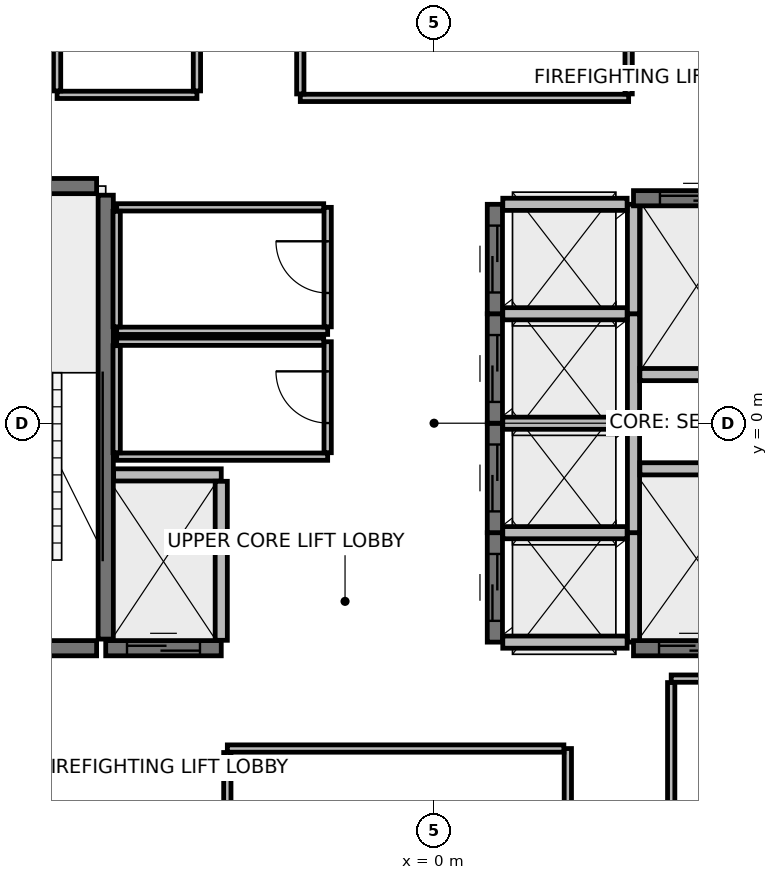
"""IFC4 building model, lengths in metres.
Left out: names, types, materials, properties, quantities, classifications, styles, units other than length and angle.
Written with IfcOpenShell. Run it as: python <this file> out.ifc"""

import sys

from ifc_helpers import new_model, si_unit, direction, frame, frame_2d, origin, place, context, subcontext, project, spatial, rectangle, extrude, element, fill, save


model = new_model("IFC4")
c1 = context("Model", 3, precision=1e-05, world=origin(), true_north=direction((0.0, 1.0)))
c2 = subcontext(c1, "Body", "Model", "MODEL_VIEW")
j1 = project(units=[si_unit("LENGTHUNIT", "METRE"), si_unit("PLANEANGLEUNIT", "RADIAN")], contexts=[c1])
p1 = place(None, origin())
s1 = spatial("IfcSite", under=j1, at=p1, CompositionType="ELEMENT")
p2 = place(p1, origin())
s2 = spatial("IfcBuilding", under=s1, at=p2, CompositionType="ELEMENT")
p3 = place(p2, frame((0.0, 0.0, 306.3)))
s3 = spatial("IfcBuildingStorey", under=s2, at=p3, CompositionType="ELEMENT", Elevation=306.3)
p4 = place(p3, frame((-24.537, -0.339, 0.0), z_axis=(0.0, 0.0, 1.0), x_axis=(0.669127961041, -0.743147207324, 0.0)))
e1 = element("IfcWall", 1, at=p4, inside=s3, PredefinedType="STANDARD", context=c2, shape_type="SweptSolid", body=[
    extrude(rectangle(XDim=42.14, YDim=0.3, at=frame_2d((21.07, 0.0))), origin(), (0.0, 0.0, 1.0), 3.805),
])
p5 = place(p4, frame((20.27, 0.0, 0.0)))
e2 = element("IfcOpeningElement", 2, at=p5, cuts=e1, PredefinedType="OPENING", context=c2, shape_type="SweptSolid", body=[
    extrude(rectangle(XDim=1.6, YDim=2.3, at=frame_2d((0.8, 1.15))), frame((0.0, 0.16, 0.0), z_axis=(0.0, -1.0, 0.0), x_axis=(1.0, 0.0, 0.0)), (0.0, 0.0, 1.0), 0.32),
])
p6 = place(p4, frame((9.535, 0.0, 0.85)))
e3 = element("IfcOpeningElement", 3, at=p6, cuts=e1, PredefinedType="OPENING", context=c2, shape_type="SweptSolid", body=[
    extrude(rectangle(XDim=2.0, YDim=2.4, at=frame_2d((1.0, 1.2))), frame((0.0, 0.16, 0.0), z_axis=(0.0, -1.0, 0.0), x_axis=(1.0, 0.0, 0.0)), (0.0, 0.0, 1.0), 0.32),
])
p7 = place(p4, frame((30.605, 0.0, 0.85)))
e4 = element("IfcOpeningElement", 4, at=p7, cuts=e1, PredefinedType="OPENING", context=c2, shape_type="SweptSolid", body=[
    extrude(rectangle(XDim=2.0, YDim=2.4, at=frame_2d((1.0, 1.2))), frame((0.0, 0.16, 0.0), z_axis=(0.0, -1.0, 0.0), x_axis=(1.0, 0.0, 0.0)), (0.0, 0.0, 1.0), 0.32),
])
p8 = place(p3, frame((-5.4, -3.55, 0.0), z_axis=(0.0, 0.0, 1.0), x_axis=(0.0, 1.0, 0.0)))
e5 = element("IfcWall", 5, at=p8, inside=s3, PredefinedType="SHEAR", context=c2, shape_type="SweptSolid", body=[
    extrude(rectangle(XDim=7.3, YDim=0.25, at=frame_2d((3.65, 0.0))), origin(), (0.0, 0.0, 1.0), 4.31),
])
p9 = place(p3, frame((-8.5, -3.7, 0.0), z_axis=(0.0, 0.0, 1.0), x_axis=(1.0, 0.0, 0.0)))
e6 = element("IfcWall", 6, at=p9, inside=s3, PredefinedType="SHEAR", context=c2, shape_type="SweptSolid", body=[
    extrude(rectangle(XDim=2.95, YDim=0.25, at=frame_2d((1.475, 0.0))), origin(), (0.0, 0.0, 1.0), 4.31),
])
p10 = place(p9, frame((0.9, 0.0, 0.0)))
e7 = element("IfcOpeningElement", 7, at=p10, cuts=e6, PredefinedType="OPENING", context=c2, shape_type="SweptSolid", body=[
    extrude(rectangle(XDim=1.1, YDim=2.15, at=frame_2d((0.55, 1.075))), frame((0.0, 0.135, 0.0), z_axis=(0.0, -1.0, 0.0), x_axis=(1.0, 0.0, 0.0)), (0.0, 0.0, 1.0), 0.27),
])
p11 = place(p3, frame((-8.5, 3.9, 0.0), z_axis=(0.0, 0.0, 1.0), x_axis=(1.0, 0.0, 0.0)))
e8 = element("IfcWall", 8, at=p11, inside=s3, PredefinedType="SHEAR", context=c2, shape_type="SweptSolid", body=[
    extrude(rectangle(XDim=2.95, YDim=0.25, at=frame_2d((1.475, 0.0))), origin(), (0.0, 0.0, 1.0), 4.31),
])
p12 = place(p3, frame((1.0, -3.6, 0.0), z_axis=(0.0, 0.0, 1.0), x_axis=(0.0, 1.0, 0.0)))
e9 = element("IfcWall", 9, at=p12, inside=s3, PredefinedType="SHEAR", context=c2, shape_type="SweptSolid", body=[
    extrude(rectangle(XDim=1.8, YDim=0.25, at=frame_2d((0.9, 0.0))), origin(), (0.0, 0.0, 1.0), 4.31),
])
p13 = place(p12, frame((0.35, 0.0, 0.0)))
e10 = element("IfcOpeningElement", 10, at=p13, cuts=e9, PredefinedType="OPENING", context=c2, shape_type="SweptSolid", body=[
    extrude(rectangle(XDim=1.1, YDim=2.2, at=frame_2d((0.55, 1.1))), frame((0.0, 0.135, 0.0), z_axis=(0.0, -1.0, 0.0), x_axis=(1.0, 0.0, 0.0)), (0.0, 0.0, 1.0), 0.27),
])
p14 = place(p3, frame((3.28, -3.6, 0.0), z_axis=(0.0, 0.0, 1.0), x_axis=(0.0, 1.0, 0.0)))
e11 = element("IfcWall", 11, at=p14, inside=s3, PredefinedType="PARTITIONING", context=c2, shape_type="SweptSolid", body=[
    extrude(rectangle(XDim=1.8, YDim=0.2, at=frame_2d((0.9, 0.0))), origin(), (0.0, 0.0, 1.0), 4.31),
])
for number, where, z_axis, x_axis in (
    (12, (1.13, -3.6, 0.0), (0.0, 0.0, 1.0), (1.0, 0.0, 0.0)),
    (13, (1.13, -1.8, 0.0), (0.0, 0.0, 1.0), (1.0, 0.0, 0.0)),
):
    element("IfcWall", number, at=place(p3, frame(where, z_axis=z_axis, x_axis=x_axis)), inside=s3, PredefinedType="PARTITIONING", context=c2, shape_type="SweptSolid", body=[
        extrude(rectangle(XDim=2.045, YDim=0.2, at=frame_2d((1.022, 0.0))), origin(), (0.0, 0.0, 1.0), 4.31),
    ])
p15 = place(p3, frame((1.0, -1.8, 0.0), z_axis=(0.0, 0.0, 1.0), x_axis=(0.0, 1.0, 0.0)))
e14 = element("IfcWall", 14, at=p15, inside=s3, PredefinedType="SHEAR", context=c2, shape_type="SweptSolid", body=[
    extrude(rectangle(XDim=1.8, YDim=0.25, at=frame_2d((0.9, 0.0))), origin(), (0.0, 0.0, 1.0), 4.31),
])
p16 = place(p15, frame((0.35, 0.0, 0.0)))
e15 = element("IfcOpeningElement", 15, at=p16, cuts=e14, PredefinedType="OPENING", context=c2, shape_type="SweptSolid", body=[
    extrude(rectangle(XDim=1.1, YDim=2.2, at=frame_2d((0.55, 1.1))), frame((0.0, 0.135, 0.0), z_axis=(0.0, -1.0, 0.0), x_axis=(1.0, 0.0, 0.0)), (0.0, 0.0, 1.0), 0.27),
])
p17 = place(p3, frame((3.28, -1.8, 0.0), z_axis=(0.0, 0.0, 1.0), x_axis=(0.0, 1.0, 0.0)))
e16 = element("IfcWall", 16, at=p17, inside=s3, PredefinedType="PARTITIONING", context=c2, shape_type="SweptSolid", body=[
    extrude(rectangle(XDim=1.8, YDim=0.2, at=frame_2d((0.9, 0.0))), origin(), (0.0, 0.0, 1.0), 4.31),
])
p18 = place(p3, frame((1.13, 0.0, 0.0), z_axis=(0.0, 0.0, 1.0), x_axis=(1.0, 0.0, 0.0)))
e17 = element("IfcWall", 17, at=p18, inside=s3, PredefinedType="PARTITIONING", context=c2, shape_type="SweptSolid", body=[
    extrude(rectangle(XDim=2.045, YDim=0.2, at=frame_2d((1.022, 0.0))), origin(), (0.0, 0.0, 1.0), 4.31),
])
p19 = place(p3, frame((1.0, 0.0, 0.0), z_axis=(0.0, 0.0, 1.0), x_axis=(0.0, 1.0, 0.0)))
e18 = element("IfcWall", 18, at=p19, inside=s3, PredefinedType="SHEAR", context=c2, shape_type="SweptSolid", body=[
    extrude(rectangle(XDim=1.8, YDim=0.25, at=frame_2d((0.9, 0.0))), origin(), (0.0, 0.0, 1.0), 4.31),
])
p20 = place(p19, frame((0.35, 0.0, 0.0)))
e19 = element("IfcOpeningElement", 19, at=p20, cuts=e18, PredefinedType="OPENING", context=c2, shape_type="SweptSolid", body=[
    extrude(rectangle(XDim=1.1, YDim=2.2, at=frame_2d((0.55, 1.1))), frame((0.0, 0.135, 0.0), z_axis=(0.0, -1.0, 0.0), x_axis=(1.0, 0.0, 0.0)), (0.0, 0.0, 1.0), 0.27),
])
p21 = place(p3, frame((3.28, 0.0, 0.0), z_axis=(0.0, 0.0, 1.0), x_axis=(0.0, 1.0, 0.0)))
e20 = element("IfcWall", 20, at=p21, inside=s3, PredefinedType="PARTITIONING", context=c2, shape_type="SweptSolid", body=[
    extrude(rectangle(XDim=1.8, YDim=0.2, at=frame_2d((0.9, 0.0))), origin(), (0.0, 0.0, 1.0), 4.31),
])
p22 = place(p3, frame((1.13, 1.8, 0.0), z_axis=(0.0, 0.0, 1.0), x_axis=(1.0, 0.0, 0.0)))
e21 = element("IfcWall", 21, at=p22, inside=s3, PredefinedType="PARTITIONING", context=c2, shape_type="SweptSolid", body=[
    extrude(rectangle(XDim=2.045, YDim=0.2, at=frame_2d((1.022, 0.0))), origin(), (0.0, 0.0, 1.0), 4.31),
])
p23 = place(p3, frame((1.0, 1.8, 0.0), z_axis=(0.0, 0.0, 1.0), x_axis=(0.0, 1.0, 0.0)))
e22 = element("IfcWall", 22, at=p23, inside=s3, PredefinedType="SHEAR", context=c2, shape_type="SweptSolid", body=[
    extrude(rectangle(XDim=1.8, YDim=0.25, at=frame_2d((0.9, 0.0))), origin(), (0.0, 0.0, 1.0), 4.31),
])
p24 = place(p23, frame((0.35, 0.0, 0.0)))
e23 = element("IfcOpeningElement", 23, at=p24, cuts=e22, PredefinedType="OPENING", context=c2, shape_type="SweptSolid", body=[
    extrude(rectangle(XDim=1.1, YDim=2.2, at=frame_2d((0.55, 1.1))), frame((0.0, 0.135, 0.0), z_axis=(0.0, -1.0, 0.0), x_axis=(1.0, 0.0, 0.0)), (0.0, 0.0, 1.0), 0.27),
])
p25 = place(p3, frame((3.28, 1.8, 0.0), z_axis=(0.0, 0.0, 1.0), x_axis=(0.0, 1.0, 0.0)))
e24 = element("IfcWall", 24, at=p25, inside=s3, PredefinedType="PARTITIONING", context=c2, shape_type="SweptSolid", body=[
    extrude(rectangle(XDim=1.8, YDim=0.2, at=frame_2d((0.9, 0.0))), origin(), (0.0, 0.0, 1.0), 4.31),
])
p26 = place(p3, frame((1.13, 3.6, 0.0), z_axis=(0.0, 0.0, 1.0), x_axis=(1.0, 0.0, 0.0)))
e25 = element("IfcWall", 25, at=p26, inside=s3, PredefinedType="PARTITIONING", context=c2, shape_type="SweptSolid", body=[
    extrude(rectangle(XDim=2.045, YDim=0.2, at=frame_2d((1.022, 0.0))), origin(), (0.0, 0.0, 1.0), 3.605),
])
p27 = place(p3, frame((-5.4, -3.7, 0.0), z_axis=(0.0, 0.0, 1.0), x_axis=(1.0, 0.0, 0.0)))
e26 = element("IfcWall", 26, at=p27, inside=s3, PredefinedType="SHEAR", context=c2, shape_type="SweptSolid", body=[
    extrude(rectangle(XDim=1.9, YDim=0.25, at=frame_2d((0.95, 0.0))), origin(), (0.0, 0.0, 1.0), 4.31),
])
p28 = place(p27, frame((0.35, 0.0, 0.0)))
e27 = element("IfcOpeningElement", 27, at=p28, cuts=e26, PredefinedType="OPENING", context=c2, shape_type="SweptSolid", body=[
    extrude(rectangle(XDim=1.2, YDim=2.2, at=frame_2d((0.6, 1.1))), frame((0.0, 0.135, 0.0), z_axis=(0.0, -1.0, 0.0), x_axis=(1.0, 0.0, 0.0)), (0.0, 0.0, 1.0), 0.27),
])
p29 = place(p3, frame((-5.27, -0.85, 0.0), z_axis=(0.0, 0.0, 1.0), x_axis=(1.0, 0.0, 0.0)))
e28 = element("IfcWall", 28, at=p29, inside=s3, PredefinedType="PARTITIONING", context=c2, shape_type="SweptSolid", body=[
    extrude(rectangle(XDim=1.77, YDim=0.2, at=frame_2d((0.885, 0.0))), origin(), (0.0, 0.0, 1.0), 4.31),
])
p30 = place(p3, frame((-3.5, -3.57, 0.0), z_axis=(0.0, 0.0, 1.0), x_axis=(0.0, 1.0, 0.0)))
e29 = element("IfcWall", 29, at=p30, inside=s3, PredefinedType="PARTITIONING", context=c2, shape_type="SweptSolid", body=[
    extrude(rectangle(XDim=2.615, YDim=0.2, at=frame_2d((1.308, 0.0))), origin(), (0.0, 0.0, 1.0), 4.31),
])
p31 = place(p3, frame((3.28, 3.7, 0.0), z_axis=(0.0, 0.0, 1.0), x_axis=(1.0, 0.0, 0.0)))
e30 = element("IfcWall", 30, at=p31, inside=s3, PredefinedType="SHEAR", context=c2, shape_type="SweptSolid", body=[
    extrude(rectangle(XDim=2.07, YDim=0.25, at=frame_2d((1.035, 0.0))), origin(), (0.0, 0.0, 1.0), 4.31),
])
p32 = place(p31, frame((0.435, 0.0, 0.0)))
e31 = element("IfcOpeningElement", 31, at=p32, cuts=e30, PredefinedType="OPENING", context=c2, shape_type="SweptSolid", body=[
    extrude(rectangle(XDim=1.2, YDim=2.2, at=frame_2d((0.6, 1.1))), frame((0.0, 0.135, 0.0), z_axis=(0.0, -1.0, 0.0), x_axis=(1.0, 0.0, 0.0)), (0.0, 0.0, 1.0), 0.27),
])
p33 = place(p3, frame((3.385, 0.8, 0.0), z_axis=(0.0, 0.0, 1.0), x_axis=(1.0, 0.0, 0.0)))
e32 = element("IfcWall", 32, at=p33, inside=s3, PredefinedType="PARTITIONING", context=c2, shape_type="SweptSolid", body=[
    extrude(rectangle(XDim=1.835, YDim=0.2, at=frame_2d((0.917, 0.0))), origin(), (0.0, 0.0, 1.0), 4.31),
])
p34 = place(p3, frame((3.28, -3.7, 0.0), z_axis=(0.0, 0.0, 1.0), x_axis=(1.0, 0.0, 0.0)))
e33 = element("IfcWall", 33, at=p34, inside=s3, PredefinedType="SHEAR", context=c2, shape_type="SweptSolid", body=[
    extrude(rectangle(XDim=1.94, YDim=0.25, at=frame_2d((0.97, 0.0))), origin(), (0.0, 0.0, 1.0), 4.31),
])
p35 = place(p34, frame((0.42, 0.0, 0.0)))
e34 = element("IfcOpeningElement", 34, at=p35, cuts=e33, PredefinedType="OPENING", context=c2, shape_type="SweptSolid", body=[
    extrude(rectangle(XDim=1.1, YDim=2.2, at=frame_2d((0.55, 1.1))), frame((0.0, 0.135, 0.0), z_axis=(0.0, -1.0, 0.0), x_axis=(1.0, 0.0, 0.0)), (0.0, 0.0, 1.0), 0.27),
])
p36 = place(p3, frame((3.385, -0.75, 0.0), z_axis=(0.0, 0.0, 1.0), x_axis=(1.0, 0.0, 0.0)))
e35 = element("IfcWall", 35, at=p36, inside=s3, PredefinedType="PARTITIONING", context=c2, shape_type="SweptSolid", body=[
    extrude(rectangle(XDim=1.835, YDim=0.2, at=frame_2d((0.917, 0.0))), origin(), (0.0, 0.0, 1.0), 4.31),
])
p37 = place(p3, frame((-5.22, 1.52, 0.0), z_axis=(0.0, 0.0, 1.0), x_axis=(1.0, 0.0, 0.0)))
e36 = element("IfcWall", 36, at=p37, inside=s3, PredefinedType="PARTITIONING", context=c2, shape_type="SweptSolid", body=[
    extrude(rectangle(XDim=3.47, YDim=0.12, at=frame_2d((1.735, 0.0))), origin(), (0.0, 0.0, 1.0), 4.31),
])
p38 = place(p3, frame((-1.75, 1.585, 0.0), z_axis=(0.0, 0.0, 1.0), x_axis=(0.0, 1.0, 0.0)))
e37 = element("IfcWall", 37, at=p38, inside=s3, PredefinedType="PARTITIONING", context=c2, shape_type="SweptSolid", body=[
    extrude(rectangle(XDim=1.965, YDim=0.12, at=frame_2d((0.982, 0.0))), origin(), (0.0, 0.0, 1.0), 4.31),
])
p39 = place(p38, frame((0.557, 0.0, 0.0)))
e38 = element("IfcOpeningElement", 38, at=p39, cuts=e37, PredefinedType="OPENING", context=c2, shape_type="SweptSolid", body=[
    extrude(rectangle(XDim=0.85, YDim=2.1, at=frame_2d((0.425, 1.05))), frame((0.0, 0.07, 0.0), z_axis=(0.0, -1.0, 0.0), x_axis=(1.0, 0.0, 0.0)), (0.0, 0.0, 1.0), 0.14),
])
p40 = place(p3, frame((-1.815, 3.55, 0.0), z_axis=(0.0, 0.0, 1.0), x_axis=(-1.0, 0.0, 0.0)))
e39 = element("IfcWall", 39, at=p40, inside=s3, PredefinedType="PARTITIONING", context=c2, shape_type="SweptSolid", body=[
    extrude(rectangle(XDim=3.405, YDim=0.12, at=frame_2d((1.703, 0.0))), origin(), (0.0, 0.0, 1.0), 4.31),
])
p41 = place(p3, frame((-5.22, 3.485, 0.0), z_axis=(0.0, 0.0, 1.0), x_axis=(0.0, -1.0, 0.0)))
e40 = element("IfcWall", 40, at=p41, inside=s3, PredefinedType="PARTITIONING", context=c2, shape_type="SweptSolid", body=[
    extrude(rectangle(XDim=1.9, YDim=0.12, at=frame_2d((0.95, 0.0))), origin(), (0.0, 0.0, 1.0), 4.31),
])
p42 = place(p3, frame((-5.22, -0.55, 0.0), z_axis=(0.0, 0.0, 1.0), x_axis=(1.0, 0.0, 0.0)))
e41 = element("IfcWall", 41, at=p42, inside=s3, PredefinedType="PARTITIONING", context=c2, shape_type="SweptSolid", body=[
    extrude(rectangle(XDim=3.47, YDim=0.12, at=frame_2d((1.735, 0.0))), origin(), (0.0, 0.0, 1.0), 4.31),
])
p43 = place(p3, frame((-1.75, -0.485, 0.0), z_axis=(0.0, 0.0, 1.0), x_axis=(0.0, 1.0, 0.0)))
e42 = element("IfcWall", 42, at=p43, inside=s3, PredefinedType="PARTITIONING", context=c2, shape_type="SweptSolid", body=[
    extrude(rectangle(XDim=1.825, YDim=0.12, at=frame_2d((0.913, 0.0))), origin(), (0.0, 0.0, 1.0), 4.31),
])
p44 = place(p43, frame((0.488, 0.0, 0.0)))
e43 = element("IfcOpeningElement", 43, at=p44, cuts=e42, PredefinedType="OPENING", context=c2, shape_type="SweptSolid", body=[
    extrude(rectangle(XDim=0.85, YDim=2.1, at=frame_2d((0.425, 1.05))), frame((0.0, 0.07, 0.0), z_axis=(0.0, -1.0, 0.0), x_axis=(1.0, 0.0, 0.0)), (0.0, 0.0, 1.0), 0.14),
])
p45 = place(p3, frame((-1.815, 1.34, 0.0), z_axis=(0.0, 0.0, 1.0), x_axis=(-1.0, 0.0, 0.0)))
e44 = element("IfcWall", 44, at=p45, inside=s3, PredefinedType="PARTITIONING", context=c2, shape_type="SweptSolid", body=[
    extrude(rectangle(XDim=3.405, YDim=0.12, at=frame_2d((1.703, 0.0))), origin(), (0.0, 0.0, 1.0), 4.31),
])
p46 = place(p3, frame((-5.22, 1.275, 0.0), z_axis=(0.0, 0.0, 1.0), x_axis=(0.0, -1.0, 0.0)))
e45 = element("IfcWall", 45, at=p46, inside=s3, PredefinedType="PARTITIONING", context=c2, shape_type="SweptSolid", body=[
    extrude(rectangle(XDim=1.76, YDim=0.12, at=frame_2d((0.88, 0.0))), origin(), (0.0, 0.0, 1.0), 4.31),
])
p47 = place(p3, frame((2.2, -7.42, 0.0), z_axis=(0.0, 0.0, 1.0), x_axis=(0.0, 1.0, 0.0)))
e46 = element("IfcWall", 46, at=p47, inside=s3, PredefinedType="PARTITIONING", context=c2, shape_type="SweptSolid", body=[
    extrude(rectangle(XDim=2.07, YDim=0.12, at=frame_2d((1.035, 0.0))), origin(), (0.0, 0.0, 1.0), 3.605),
])
p48 = place(p3, frame((2.135, -5.35, 0.0), z_axis=(0.0, 0.0, 1.0), x_axis=(-1.0, 0.0, 0.0)))
e47 = element("IfcWall", 47, at=p48, inside=s3, PredefinedType="PARTITIONING", context=c2, shape_type="SweptSolid", body=[
    extrude(rectangle(XDim=5.535, YDim=0.12, at=frame_2d((2.768, 0.0))), origin(), (0.0, 0.0, 1.0), 3.605),
])
p49 = place(p3, frame((-3.4, -5.415, 0.0), z_axis=(0.0, 0.0, 1.0), x_axis=(0.0, -1.0, 0.0)))
e48 = element("IfcWall", 48, at=p49, inside=s3, PredefinedType="PARTITIONING", context=c2, shape_type="SweptSolid", body=[
    extrude(rectangle(XDim=2.8, YDim=0.12, at=frame_2d((1.4, 0.0))), origin(), (0.0, 0.0, 1.0), 3.605),
])
p50 = place(p3, frame((-2.2, 5.35, 0.0), z_axis=(0.0, 0.0, 1.0), x_axis=(1.0, 0.0, 0.0)))
e49 = element("IfcWall", 49, at=p50, inside=s3, PredefinedType="PARTITIONING", context=c2, shape_type="SweptSolid", body=[
    extrude(rectangle(XDim=5.4, YDim=0.12, at=frame_2d((2.7, 0.0))), origin(), (0.0, 0.0, 1.0), 3.605),
])
p51 = place(p3, frame((3.2, 5.415, 0.0), z_axis=(0.0, 0.0, 1.0), x_axis=(0.0, 1.0, 0.0)))
e50 = element("IfcWall", 50, at=p51, inside=s3, PredefinedType="PARTITIONING", context=c2, shape_type="SweptSolid", body=[
    extrude(rectangle(XDim=2.8, YDim=0.12, at=frame_2d((1.4, 0.0))), origin(), (0.0, 0.0, 1.0), 3.605),
])
p52 = place(p3, frame((-2.2, 7.42, 0.0), z_axis=(0.0, 0.0, 1.0), x_axis=(0.0, -1.0, 0.0)))
e51 = element("IfcWall", 51, at=p52, inside=s3, PredefinedType="PARTITIONING", context=c2, shape_type="SweptSolid", body=[
    extrude(rectangle(XDim=2.005, YDim=0.12, at=frame_2d((1.002, 0.0))), origin(), (0.0, 0.0, 1.0), 3.605),
])
p53 = place(p3, frame((-6.2, 5.4, 0.0), z_axis=(0.0, 0.0, 1.0), x_axis=(1.0, 0.0, 0.0)))
e52 = element("IfcWall", 52, at=p53, inside=s3, PredefinedType="PARTITIONING", context=c2, shape_type="SweptSolid", body=[
    extrude(rectangle(XDim=2.3, YDim=0.12, at=frame_2d((1.15, 0.0))), origin(), (0.0, 0.0, 1.0), 4.31),
])
for number, where, z_axis, x_axis in (
    (53, (-3.9, 5.465, 0.0), (0.0, 0.0, 1.0), (0.0, 1.0, 0.0)),
    (54, (-6.2, 8.215, 0.0), (0.0, 0.0, 1.0), (0.0, -1.0, 0.0)),
):
    element("IfcWall", number, at=place(p3, frame(where, z_axis=z_axis, x_axis=x_axis)), inside=s3, PredefinedType="PARTITIONING", context=c2, shape_type="SweptSolid", body=[
        extrude(rectangle(XDim=2.75, YDim=0.12, at=frame_2d((1.375, 0.0))), origin(), (0.0, 0.0, 1.0), 3.605),
    ])
p54 = place(p3, frame((7.735, -4.2, 0.0), z_axis=(0.0, 0.0, 1.0), x_axis=(-1.0, 0.0, 0.0)))
e55 = element("IfcWall", 55, at=p54, inside=s3, PredefinedType="PARTITIONING", context=c2, shape_type="SweptSolid", body=[
    extrude(rectangle(XDim=3.835, YDim=0.12, at=frame_2d((1.917, 0.0))), origin(), (0.0, 0.0, 1.0), 4.31),
])
p55 = place(p3, frame((3.9, -4.265, 0.0), z_axis=(0.0, 0.0, 1.0), x_axis=(0.0, -1.0, 0.0)))
e56 = element("IfcWall", 56, at=p55, inside=s3, PredefinedType="PARTITIONING", context=c2, shape_type="SweptSolid", body=[
    extrude(rectangle(XDim=3.95, YDim=0.12, at=frame_2d((1.975, 0.0))), origin(), (0.0, 0.0, 1.0), 3.605),
])
p56 = place(p13, origin())
e57 = element("IfcDoor", 57, at=p56, inside=s3, OperationType="SLIDING_TO_LEFT", PredefinedType="DOOR", context=c2, shape_type="SweptSolid", body=[
    extrude(rectangle(XDim=1.1, YDim=2.2, at=frame_2d((0.55, 1.1))), frame((0.0, 0.025, 0.0), z_axis=(0.0, -1.0, 0.0), x_axis=(1.0, 0.0, 0.0)), (0.0, 0.0, 1.0), 0.05),
])
fill(e10, e57)
p57 = place(p16, origin())
e58 = element("IfcDoor", 58, at=p57, inside=s3, OperationType="SLIDING_TO_LEFT", PredefinedType="DOOR", context=c2, shape_type="SweptSolid", body=[
    extrude(rectangle(XDim=1.1, YDim=2.2, at=frame_2d((0.55, 1.1))), frame((0.0, 0.025, 0.0), z_axis=(0.0, -1.0, 0.0), x_axis=(1.0, 0.0, 0.0)), (0.0, 0.0, 1.0), 0.05),
])
fill(e15, e58)
p58 = place(p20, origin())
e59 = element("IfcDoor", 59, at=p58, inside=s3, OperationType="SLIDING_TO_LEFT", PredefinedType="DOOR", context=c2, shape_type="SweptSolid", body=[
    extrude(rectangle(XDim=1.1, YDim=2.2, at=frame_2d((0.55, 1.1))), frame((0.0, 0.025, 0.0), z_axis=(0.0, -1.0, 0.0), x_axis=(1.0, 0.0, 0.0)), (0.0, 0.0, 1.0), 0.05),
])
fill(e19, e59)
p59 = place(p24, origin())
e60 = element("IfcDoor", 60, at=p59, inside=s3, OperationType="SLIDING_TO_LEFT", PredefinedType="DOOR", context=c2, shape_type="SweptSolid", body=[
    extrude(rectangle(XDim=1.1, YDim=2.2, at=frame_2d((0.55, 1.1))), frame((0.0, 0.025, 0.0), z_axis=(0.0, -1.0, 0.0), x_axis=(1.0, 0.0, 0.0)), (0.0, 0.0, 1.0), 0.05),
])
fill(e23, e60)
p60 = place(p28, origin())
e61 = element("IfcDoor", 61, at=p60, inside=s3, OperationType="SLIDING_TO_RIGHT", PredefinedType="DOOR", context=c2, shape_type="SweptSolid", body=[
    extrude(rectangle(XDim=1.2, YDim=2.2, at=frame_2d((0.6, 1.1))), frame((0.0, 0.025, 0.0), z_axis=(0.0, -1.0, 0.0), x_axis=(1.0, 0.0, 0.0)), (0.0, 0.0, 1.0), 0.05),
])
fill(e27, e61)
p61 = place(p32, origin())
e62 = element("IfcDoor", 62, at=p61, inside=s3, OperationType="SLIDING_TO_RIGHT", PredefinedType="DOOR", context=c2, shape_type="SweptSolid", body=[
    extrude(rectangle(XDim=1.2, YDim=2.2, at=frame_2d((0.6, 1.1))), frame((0.0, 0.025, 0.0), z_axis=(0.0, -1.0, 0.0), x_axis=(1.0, 0.0, 0.0)), (0.0, 0.0, 1.0), 0.05),
])
fill(e31, e62)
p62 = place(p35, origin())
e63 = element("IfcDoor", 63, at=p62, inside=s3, OperationType="SLIDING_TO_LEFT", PredefinedType="DOOR", context=c2, shape_type="SweptSolid", body=[
    extrude(rectangle(XDim=1.1, YDim=2.2, at=frame_2d((0.55, 1.1))), frame((0.0, 0.025, 0.0), z_axis=(0.0, -1.0, 0.0), x_axis=(1.0, 0.0, 0.0)), (0.0, 0.0, 1.0), 0.05),
])
fill(e34, e63)
p63 = place(p39, frame((0.85, 0.0, 0.0), z_axis=(0.0, 0.0, 1.0), x_axis=(-1.0, 0.0, 0.0)))
e64 = element("IfcDoor", 64, at=p63, inside=s3, OperationType="SINGLE_SWING_RIGHT", PredefinedType="DOOR", context=c2, shape_type="SweptSolid", body=[
    extrude(rectangle(XDim=0.85, YDim=2.1, at=frame_2d((0.425, 1.05))), frame((0.0, 0.025, 0.0), z_axis=(0.0, -1.0, 0.0), x_axis=(1.0, 0.0, 0.0)), (0.0, 0.0, 1.0), 0.05),
])
fill(e38, e64)
p64 = place(p44, frame((0.85, 0.0, 0.0), z_axis=(0.0, 0.0, 1.0), x_axis=(-1.0, 0.0, 0.0)))
e65 = element("IfcDoor", 65, at=p64, inside=s3, OperationType="SINGLE_SWING_RIGHT", PredefinedType="DOOR", context=c2, shape_type="SweptSolid", body=[
    extrude(rectangle(XDim=0.85, YDim=2.1, at=frame_2d((0.425, 1.05))), frame((0.0, 0.025, 0.0), z_axis=(0.0, -1.0, 0.0), x_axis=(1.0, 0.0, 0.0)), (0.0, 0.0, 1.0), 0.05),
])
fill(e43, e65)
save(model, sys.argv[1])
